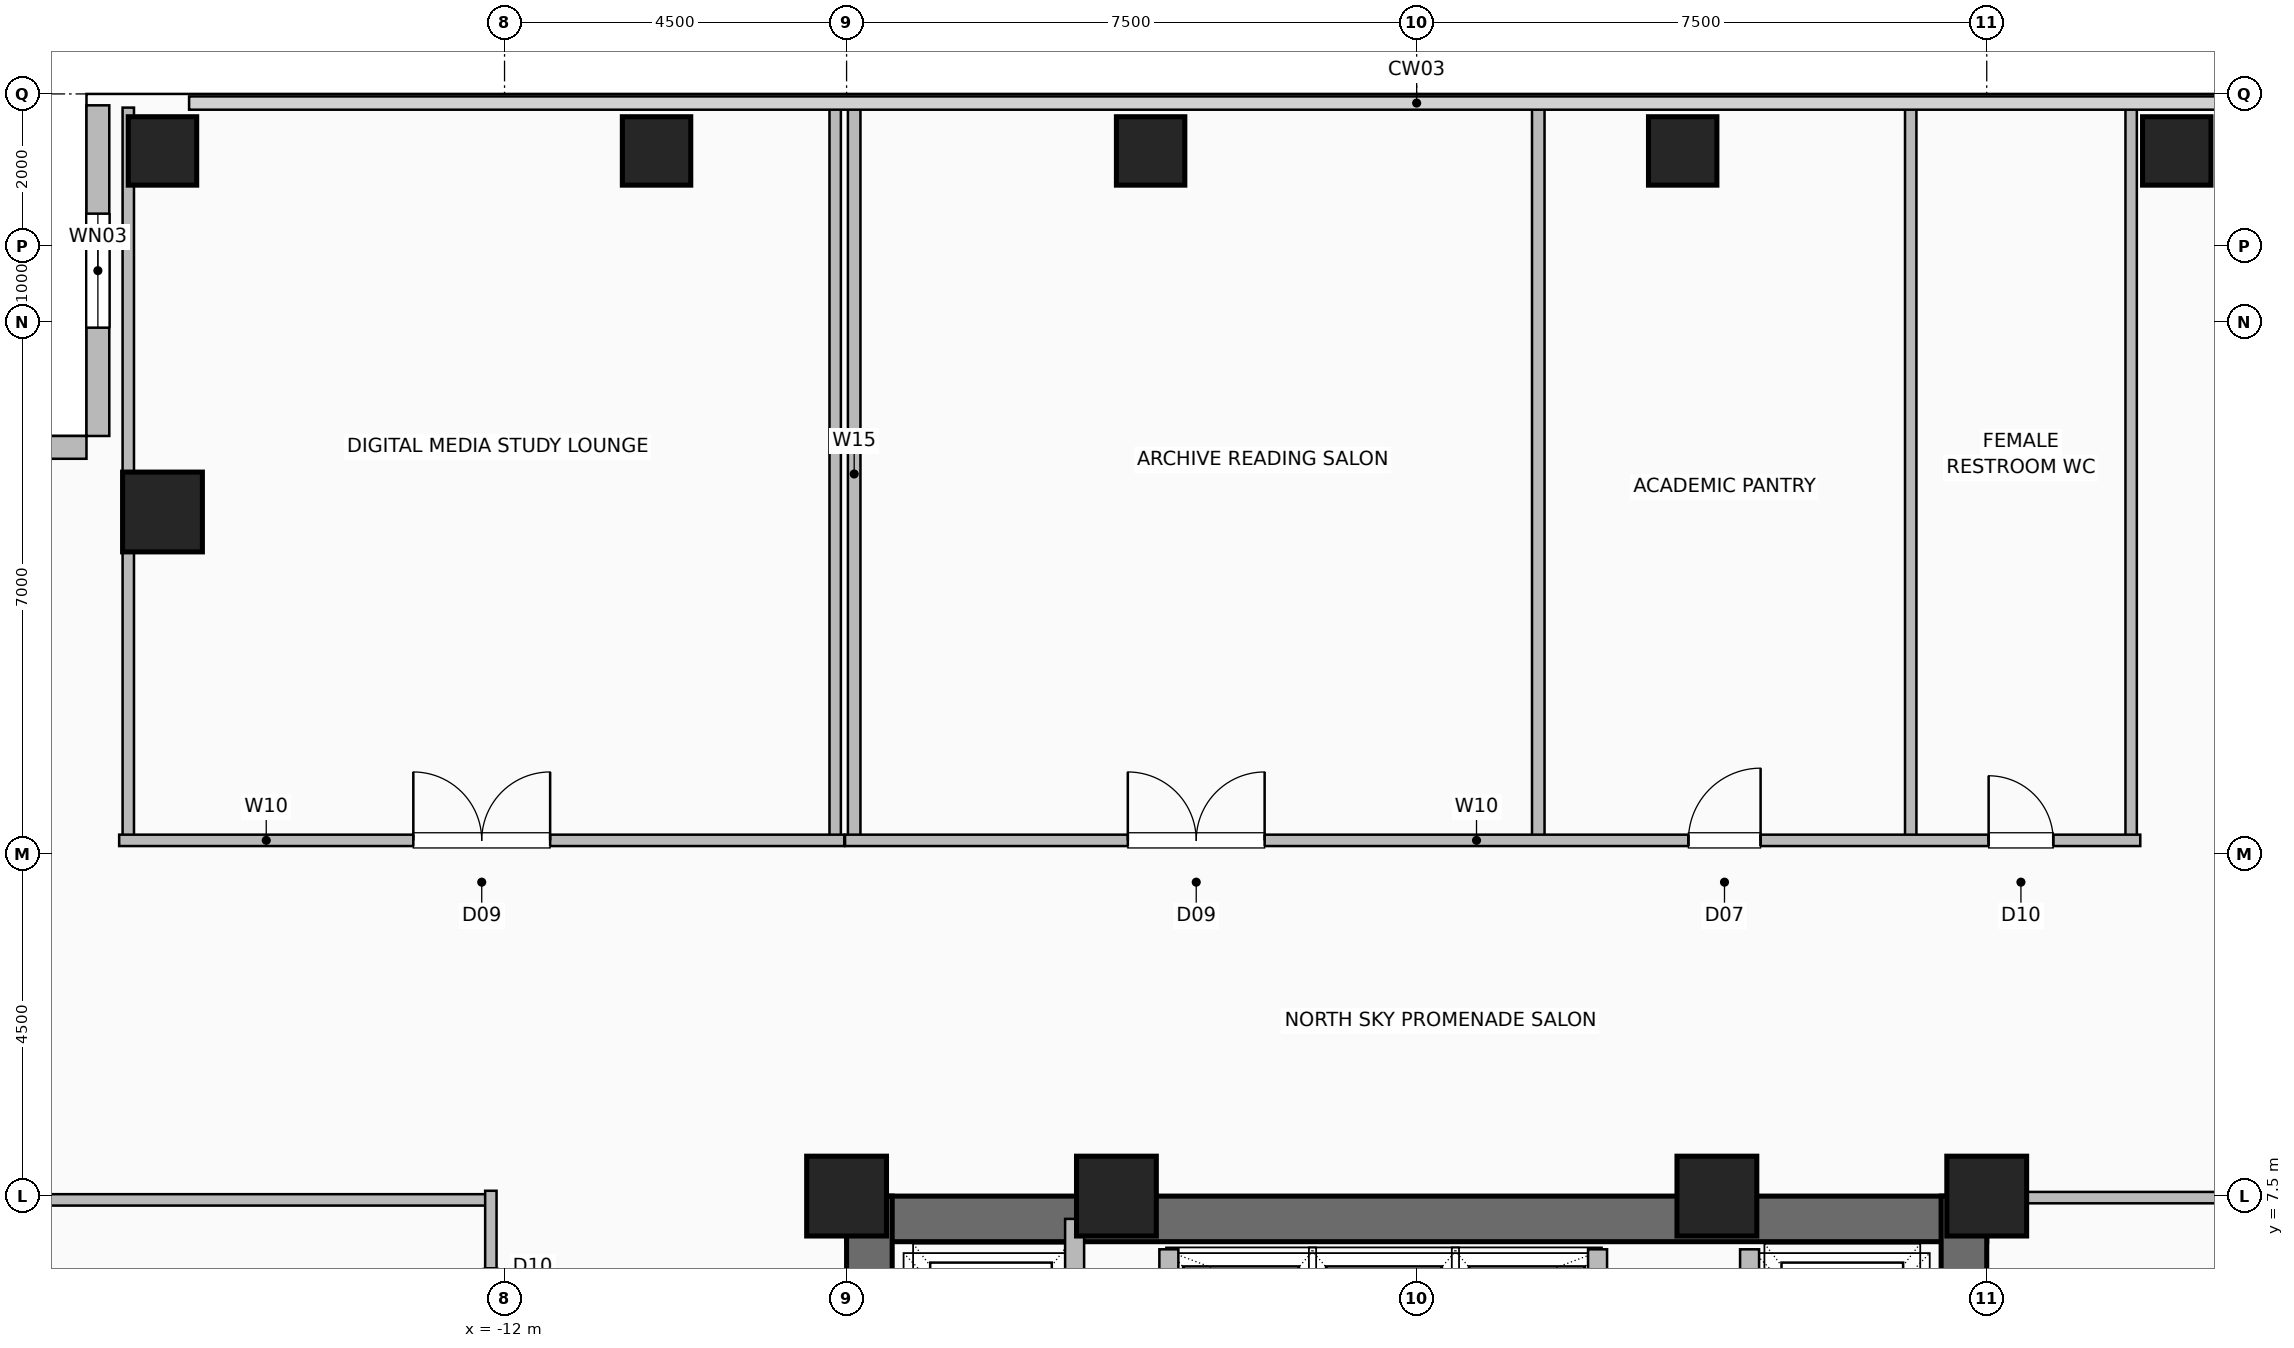
"""IFC4 building model, lengths in metres.
Left out: names, types, materials, properties, quantities, classifications, styles, units other than length and angle.
Written with IfcOpenShell. Run it as: python <this file> out.ifc"""

import sys

from ifc_helpers import new_model, si_unit, direction, frame, frame_2d, origin, origin_2d, place, context, subcontext, project, spatial, rectangle, hollow_rectangle, extrude, element, fill, save


model = new_model("IFC4")
c1 = context("Model", 3, precision=1e-05, world=origin(), true_north=direction((0.0, 1.0)))
c2 = subcontext(c1, "Body", "Model", "MODEL_VIEW")
j1 = project(units=[si_unit("LENGTHUNIT", "METRE"), si_unit("PLANEANGLEUNIT", "RADIAN")], contexts=[c1])
p1 = place(None, origin())
s1 = spatial("IfcSite", under=j1, at=p1, CompositionType="ELEMENT")
p2 = place(p1, origin())
s2 = spatial("IfcBuilding", under=s1, at=p2, CompositionType="ELEMENT")
p3 = place(p2, frame((0.0, 0.0, 130.0)))
s3 = spatial("IfcBuildingStorey", under=s2, at=p3, CompositionType="ELEMENT", Elevation=130.0)
for number, where, z_axis, x_axis in (
    (1, (7.5, 7.5, 0.0), (0.0, 0.0, 1.0), (1.0, 0.0, 0.0)),
    (2, (3.95, 7.5, 0.0), (0.0, 0.0, 1.0), (1.0, 0.0, 0.0)),
    (3, (-3.95, 7.5, 0.0), (0.0, 0.0, 1.0), (1.0, 0.0, 0.0)),
    (4, (-7.5, 7.5, 0.0), (0.0, 0.0, 1.0), (1.0, 0.0, 0.0)),
):
    element("IfcColumn", number, at=place(p3, frame(where, z_axis=z_axis, x_axis=x_axis)), inside=s3, PredefinedType="COLUMN", context=c2, shape_type="SweptSolid", body=[
        extrude(hollow_rectangle(XDim=1.05, YDim=1.05, WallThickness=0.05, at=origin_2d()), origin(), (0.0, 0.0, 1.0), 3.6),
    ])
for number, where, z_axis, x_axis in (
    (5, (-16.5, 21.25, 0.0), (0.0, 0.0, 1.0), (1.0, 0.0, 0.0)),
    (6, (-10.0, 21.25, 0.0), (0.0, 0.0, 1.0), (1.0, 0.0, 0.0)),
    (7, (-3.5, 21.25, 0.0), (0.0, 0.0, 1.0), (1.0, 0.0, 0.0)),
    (8, (3.5, 21.25, 0.0), (0.0, 0.0, 1.0), (1.0, 0.0, 0.0)),
    (9, (10.0, 21.25, 0.0), (0.0, 0.0, 1.0), (1.0, 0.0, 0.0)),
):
    element("IfcColumn", number, at=place(p3, frame(where, z_axis=z_axis, x_axis=x_axis)), inside=s3, PredefinedType="COLUMN", context=c2, shape_type="SweptSolid", body=[
        extrude(hollow_rectangle(XDim=0.9, YDim=0.9, WallThickness=0.045, at=origin_2d()), origin(), (0.0, 0.0, 1.0), 3.6),
    ])
p4 = place(p3, frame((-16.5, 16.5, 0.0), z_axis=(0.0, 0.0, 1.0), x_axis=(1.0, 0.0, 0.0)))
e10 = element("IfcColumn", 10, at=p4, inside=s3, PredefinedType="COLUMN", context=c2, shape_type="SweptSolid", body=[
    extrude(hollow_rectangle(XDim=1.05, YDim=1.05, WallThickness=0.05, at=origin_2d()), origin(), (0.0, 0.0, 1.0), 3.6),
])
p5 = place(p3, frame((-17.35, 21.85, 0.0), z_axis=(0.0, 0.0, 1.0), x_axis=(0.0, -1.0, 0.0)))
e11 = element("IfcWall", 11, at=p5, inside=s3, PredefinedType="SOLIDWALL", context=c2, shape_type="SweptSolid", body=[
    extrude(rectangle(XDim=4.35, YDim=0.3, at=frame_2d((2.175, 0.0))), origin(), (0.0, 0.0, 1.0), 3.36),
])
p6 = place(p5, frame((1.425, 0.0, 0.9)))
e12 = element("IfcOpeningElement", 12, at=p6, cuts=e11, PredefinedType="OPENING", context=c2, shape_type="SweptSolid", body=[
    extrude(rectangle(XDim=1.5, YDim=1.8, at=frame_2d((0.75, 0.9))), frame((0.0, 0.16, 0.0), z_axis=(0.0, -1.0, 0.0), x_axis=(1.0, 0.0, 0.0)), (0.0, 0.0, 1.0), 0.32),
])
p7 = place(p3, frame((-21.85, 17.35, 0.0), z_axis=(0.0, 0.0, 1.0), x_axis=(1.0, 0.0, 0.0)))
e13 = element("IfcWall", 13, at=p7, inside=s3, PredefinedType="SOLIDWALL", context=c2, shape_type="SweptSolid", body=[
    extrude(rectangle(XDim=4.35, YDim=0.3, at=frame_2d((2.175, 0.0))), origin(), (0.0, 0.0, 1.0), 3.36),
])
p8 = place(p3, frame((-7.5, 7.2, 0.0), z_axis=(0.0, 0.0, 1.0), x_axis=(1.0, 0.0, 0.0)))
e14 = element("IfcWall", 14, at=p8, inside=s3, PredefinedType="SHEAR", context=c2, shape_type="SweptSolid", body=[
    extrude(rectangle(XDim=15.0, YDim=0.6, at=frame_2d((7.5, 0.0))), origin(), (0.0, 0.0, 1.0), 3.36),
])
p9 = place(p3, frame((-7.2, -7.5, 0.0), z_axis=(0.0, 0.0, 1.0), x_axis=(0.0, 1.0, 0.0)))
e15 = element("IfcWall", 15, at=p9, inside=s3, PredefinedType="SHEAR", context=c2, shape_type="SweptSolid", body=[
    extrude(rectangle(XDim=15.0, YDim=0.6, at=frame_2d((7.5, 0.0))), origin(), (0.0, 0.0, 1.0), 3.36),
])
p10 = place(p9, frame((9.5, 0.0, 0.0)))
e16 = element("IfcOpeningElement", 16, at=p10, cuts=e15, PredefinedType="OPENING", context=c2, shape_type="SweptSolid", body=[
    extrude(rectangle(XDim=1.0, YDim=2.08, at=frame_2d((0.5, 1.04))), frame((0.0, 0.31, 0.0), z_axis=(0.0, -1.0, 0.0), x_axis=(1.0, 0.0, 0.0)), (0.0, 0.0, 1.0), 0.62),
])
p11 = place(p3, frame((7.2, -7.5, 0.0), z_axis=(0.0, 0.0, 1.0), x_axis=(0.0, 1.0, 0.0)))
e17 = element("IfcWall", 17, at=p11, inside=s3, PredefinedType="SHEAR", context=c2, shape_type="SweptSolid", body=[
    extrude(rectangle(XDim=15.0, YDim=0.6, at=frame_2d((7.5, 0.0))), origin(), (0.0, 0.0, 1.0), 3.36),
])
for number, where, z_axis, x_axis in (
    (18, (-3.26, 4.58, 0.0), (0.0, 0.0, 1.0), (0.0, 1.0, 0.0)),
    (19, (2.38, 4.58, 0.0), (0.0, 0.0, 1.0), (0.0, 1.0, 0.0)),
):
    element("IfcWall", number, at=place(p3, frame(where, z_axis=z_axis, x_axis=x_axis)), inside=s3, PredefinedType="SHEAR", context=c2, shape_type="SweptSolid", body=[
        extrude(rectangle(XDim=2.22, YDim=0.25, at=frame_2d((1.11, 0.0))), origin(), (0.0, 0.0, 1.0), 3.36),
    ])
p12 = place(p3, frame((-4.5, 4.35, 0.0), z_axis=(0.0, 0.0, 1.0), x_axis=(0.0, 1.0, 0.0)))
e20 = element("IfcWall", 20, at=p12, inside=s3, PredefinedType="SHEAR", context=c2, shape_type="SweptSolid", body=[
    extrude(rectangle(XDim=2.85, YDim=0.25, at=frame_2d((1.425, 0.0))), origin(), (0.0, 0.0, 1.0), 3.36),
])
p13 = place(p3, frame((4.38, 4.3, 0.0), z_axis=(0.0, 0.0, 1.0), x_axis=(0.0, 1.0, 0.0)))
e21 = element("IfcWall", 21, at=p13, inside=s3, PredefinedType="SHEAR", context=c2, shape_type="SweptSolid", body=[
    extrude(rectangle(XDim=2.5, YDim=0.25, at=frame_2d((1.25, 0.0))), origin(), (0.0, 0.0, 1.0), 3.36),
])
p14 = place(p13, frame((0.8, 0.0, 0.0)))
e22 = element("IfcOpeningElement", 22, at=p14, cuts=e21, PredefinedType="OPENING", context=c2, shape_type="SweptSolid", body=[
    extrude(rectangle(XDim=1.2, YDim=2.2, at=frame_2d((0.6, 1.1))), frame((0.0, 0.135, 0.0), z_axis=(0.0, -1.0, 0.0), x_axis=(1.0, 0.0, 0.0)), (0.0, 0.0, 1.0), 0.27),
])
p15 = place(p3, frame((-21.82, 7.45, 0.0), z_axis=(0.0, 0.0, 1.0), x_axis=(1.0, 0.0, 0.0)))
e23 = element("IfcWall", 23, at=p15, inside=s3, PredefinedType="PARTITIONING", context=c2, shape_type="SweptSolid", body=[
    extrude(rectangle(XDim=9.64, YDim=0.15, at=frame_2d((4.82, 0.0))), origin(), (0.0, 0.0, 1.0), 3.36),
])
p16 = place(p3, frame((-12.18, -7.57, 0.0), z_axis=(0.0, 0.0, 1.0), x_axis=(0.0, 1.0, 0.0)))
e24 = element("IfcWall", 24, at=p16, inside=s3, PredefinedType="PARTITIONING", context=c2, shape_type="SweptSolid", body=[
    extrude(rectangle(XDim=15.14, YDim=0.15, at=frame_2d((7.57, 0.0))), origin(), (0.0, 0.0, 1.0), 3.36),
])
p17 = place(p16, frame((2.27, 0.0, 0.0)))
e25 = element("IfcOpeningElement", 25, at=p17, cuts=e24, PredefinedType="OPENING", context=c2, shape_type="SweptSolid", body=[
    extrude(rectangle(XDim=0.95, YDim=2.06, at=frame_2d((0.475, 1.03))), frame((0.0, 0.085, 0.0), z_axis=(0.0, -1.0, 0.0), x_axis=(1.0, 0.0, 0.0)), (0.0, 0.0, 1.0), 0.17),
])
p18 = place(p16, frame((8.395, 0.0, 0.0)))
e26 = element("IfcOpeningElement", 26, at=p18, cuts=e24, PredefinedType="OPENING", context=c2, shape_type="SweptSolid", body=[
    extrude(rectangle(XDim=0.95, YDim=2.06, at=frame_2d((0.475, 1.03))), frame((0.0, 0.085, 0.0), z_axis=(0.0, -1.0, 0.0), x_axis=(1.0, 0.0, 0.0)), (0.0, 0.0, 1.0), 0.17),
])
p19 = place(p16, frame((13.27, 0.0, 0.0)))
e27 = element("IfcOpeningElement", 27, at=p19, cuts=e24, PredefinedType="OPENING", context=c2, shape_type="SweptSolid", body=[
    extrude(rectangle(XDim=0.85, YDim=2.05, at=frame_2d((0.425, 1.025))), frame((0.0, 0.085, 0.0), z_axis=(0.0, -1.0, 0.0), x_axis=(1.0, 0.0, 0.0)), (0.0, 0.0, 1.0), 0.17),
])
for number, where, z_axis, x_axis in (
    (28, (-16.95, 12.18, 0.0), (0.0, 0.0, 1.0), (0.0, 1.0, 0.0)),
    (29, (-7.65, 12.18, 0.0), (0.0, 0.0, 1.0), (0.0, 1.0, 0.0)),
):
    element("IfcWall", number, at=place(p3, frame(where, z_axis=z_axis, x_axis=x_axis)), inside=s3, PredefinedType="PARTITIONING", context=c2, shape_type="SweptSolid", body=[
        extrude(rectangle(XDim=9.64, YDim=0.15, at=frame_2d((4.82, 0.0))), origin(), (0.0, 0.0, 1.0), 3.36),
    ])
p20 = place(p3, frame((-17.07, 12.18, 0.0), z_axis=(0.0, 0.0, 1.0), x_axis=(1.0, 0.0, 0.0)))
e30 = element("IfcWall", 30, at=p20, inside=s3, PredefinedType="PARTITIONING", context=c2, shape_type="SweptSolid", body=[
    extrude(rectangle(XDim=9.54, YDim=0.15, at=frame_2d((4.77, 0.0))), origin(), (0.0, 0.0, 1.0), 3.36),
])
p21 = place(p20, frame((3.87, 0.0, 0.0)))
e31 = element("IfcOpeningElement", 31, at=p21, cuts=e30, PredefinedType="OPENING", context=c2, shape_type="SweptSolid", body=[
    extrude(rectangle(XDim=1.8, YDim=2.08, at=frame_2d((0.9, 1.04))), frame((0.0, 0.085, 0.0), z_axis=(0.0, -1.0, 0.0), x_axis=(1.0, 0.0, 0.0)), (0.0, 0.0, 1.0), 0.17),
])
for number, where, z_axis, x_axis in (
    (32, (-7.4, 12.18, 0.0), (0.0, 0.0, 1.0), (0.0, 1.0, 0.0)),
    (33, (1.6, 12.18, 0.0), (0.0, 0.0, 1.0), (0.0, 1.0, 0.0)),
):
    element("IfcWall", number, at=place(p3, frame(where, z_axis=z_axis, x_axis=x_axis)), inside=s3, PredefinedType="PLUMBINGWALL", context=c2, shape_type="SweptSolid", body=[
        extrude(rectangle(XDim=9.64, YDim=0.165, at=frame_2d((4.82, 0.0))), origin(), (0.0, 0.0, 1.0), 3.36),
    ])
for number, where, z_axis, x_axis in (
    (34, (6.5, 12.18, 0.0), (0.0, 0.0, 1.0), (0.0, 1.0, 0.0)),
    (35, (9.4, 12.18, 0.0), (0.0, 0.0, 1.0), (0.0, 1.0, 0.0)),
):
    element("IfcWall", number, at=place(p3, frame(where, z_axis=z_axis, x_axis=x_axis)), inside=s3, PredefinedType="PARTITIONING", context=c2, shape_type="SweptSolid", body=[
        extrude(rectangle(XDim=9.64, YDim=0.15, at=frame_2d((4.82, 0.0))), origin(), (0.0, 0.0, 1.0), 3.36),
    ])
p22 = place(p3, frame((-7.52, 12.18, 0.0), z_axis=(0.0, 0.0, 1.0), x_axis=(1.0, 0.0, 0.0)))
e36 = element("IfcWall", 36, at=p22, inside=s3, PredefinedType="PARTITIONING", context=c2, shape_type="SweptSolid", body=[
    extrude(rectangle(XDim=17.04, YDim=0.15, at=frame_2d((8.52, 0.0))), origin(), (0.0, 0.0, 1.0), 3.36),
])
p23 = place(p22, frame((3.72, 0.0, 0.0)))
e37 = element("IfcOpeningElement", 37, at=p23, cuts=e36, PredefinedType="OPENING", context=c2, shape_type="SweptSolid", body=[
    extrude(rectangle(XDim=1.8, YDim=2.08, at=frame_2d((0.9, 1.04))), frame((0.0, 0.085, 0.0), z_axis=(0.0, -1.0, 0.0), x_axis=(1.0, 0.0, 0.0)), (0.0, 0.0, 1.0), 0.17),
])
p24 = place(p22, frame((11.095, 0.0, 0.0)))
e38 = element("IfcOpeningElement", 38, at=p24, cuts=e36, PredefinedType="OPENING", context=c2, shape_type="SweptSolid", body=[
    extrude(rectangle(XDim=0.95, YDim=2.06, at=frame_2d((0.475, 1.03))), frame((0.0, 0.085, 0.0), z_axis=(0.0, -1.0, 0.0), x_axis=(1.0, 0.0, 0.0)), (0.0, 0.0, 1.0), 0.17),
])
p25 = place(p22, frame((15.045, 0.0, 0.0)))
e39 = element("IfcOpeningElement", 39, at=p25, cuts=e36, PredefinedType="OPENING", context=c2, shape_type="SweptSolid", body=[
    extrude(rectangle(XDim=0.85, YDim=2.05, at=frame_2d((0.425, 1.025))), frame((0.0, 0.085, 0.0), z_axis=(0.0, -1.0, 0.0), x_axis=(1.0, 0.0, 0.0)), (0.0, 0.0, 1.0), 0.17),
])
p26 = place(p3, frame((7.6, 7.48, 0.0), z_axis=(0.0, 0.0, 1.0), x_axis=(1.0, 0.0, 0.0)))
e40 = element("IfcWall", 40, at=p26, inside=s3, PredefinedType="PARTITIONING", context=c2, shape_type="SweptSolid", body=[
    extrude(rectangle(XDim=14.22, YDim=0.15, at=frame_2d((7.11, 0.0))), origin(), (0.0, 0.0, 1.0), 3.36),
])
p27 = place(p6, origin())
e41 = element("IfcWindow", 41, at=p27, inside=s3, PartitioningType="SINGLE_PANEL", PredefinedType="WINDOW", context=c2, shape_type="SweptSolid", body=[
    extrude(rectangle(XDim=1.5, YDim=1.8, at=frame_2d((0.75, 0.9))), frame((0.0, 0.03, 0.0), z_axis=(0.0, -1.0, 0.0), x_axis=(1.0, 0.0, 0.0)), (0.0, 0.0, 1.0), 0.06),
])
fill(e12, e41)
p28 = place(p21, origin())
e42 = element("IfcDoor", 42, at=p28, inside=s3, OperationType="DOUBLE_DOOR_SINGLE_SWING", PredefinedType="DOOR", context=c2, shape_type="SweptSolid", body=[
    extrude(rectangle(XDim=1.8, YDim=2.08, at=frame_2d((0.9, 1.04))), frame((0.0, 0.025, 0.0), z_axis=(0.0, -1.0, 0.0), x_axis=(1.0, 0.0, 0.0)), (0.0, 0.0, 1.0), 0.05),
])
fill(e31, e42)
p29 = place(p23, origin())
e43 = element("IfcDoor", 43, at=p29, inside=s3, OperationType="DOUBLE_DOOR_SINGLE_SWING", PredefinedType="DOOR", context=c2, shape_type="SweptSolid", body=[
    extrude(rectangle(XDim=1.8, YDim=2.08, at=frame_2d((0.9, 1.04))), frame((0.0, 0.025, 0.0), z_axis=(0.0, -1.0, 0.0), x_axis=(1.0, 0.0, 0.0)), (0.0, 0.0, 1.0), 0.05),
])
fill(e37, e43)
p30 = place(p24, origin())
e44 = element("IfcDoor", 44, at=p30, inside=s3, OperationType="SINGLE_SWING_RIGHT", PredefinedType="DOOR", context=c2, shape_type="SweptSolid", body=[
    extrude(rectangle(XDim=0.95, YDim=2.06, at=frame_2d((0.475, 1.03))), frame((0.0, 0.025, 0.0), z_axis=(0.0, -1.0, 0.0), x_axis=(1.0, 0.0, 0.0)), (0.0, 0.0, 1.0), 0.05),
])
fill(e38, e44)
p31 = place(p25, origin())
e45 = element("IfcDoor", 45, at=p31, inside=s3, OperationType="SINGLE_SWING_LEFT", PredefinedType="DOOR", context=c2, shape_type="SweptSolid", body=[
    extrude(rectangle(XDim=0.85, YDim=2.05, at=frame_2d((0.425, 1.025))), frame((0.0, 0.025, 0.0), z_axis=(0.0, -1.0, 0.0), x_axis=(1.0, 0.0, 0.0)), (0.0, 0.0, 1.0), 0.05),
])
fill(e39, e45)
save(model, sys.argv[1])
